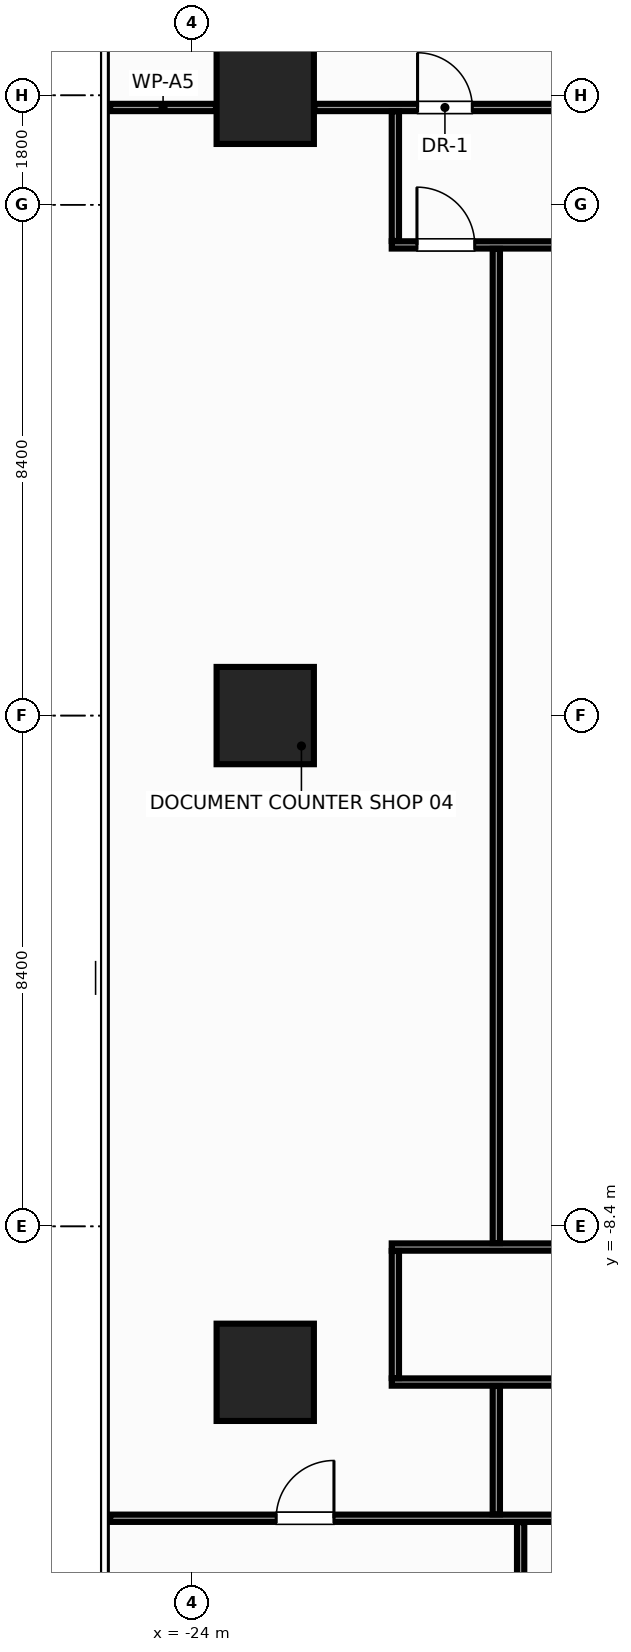
"""IFC4 building model, lengths in metres.
Left out: names, types, materials, properties, quantities, classifications, styles, units other than length and angle.
Written with IfcOpenShell. Run it as: python <this file> out.ifc"""

import sys

from ifc_helpers import new_model, si_unit, direction, frame, frame_2d, origin, origin_2d, place, context, subcontext, project, spatial, rectangle, extrude, source, transform, mapped, element, fill, save


model = new_model("IFC4")
c1 = context("Model", 3, precision=1e-05, world=origin(), true_north=direction((0.0, 1.0)))
c2 = subcontext(c1, "Body", "Model", "MODEL_VIEW")
j1 = project(units=[si_unit("LENGTHUNIT", "METRE"), si_unit("PLANEANGLEUNIT", "RADIAN")], contexts=[c1])
p1 = place(None, origin())
s1 = spatial("IfcSite", under=j1, at=p1, CompositionType="ELEMENT")
p2 = place(p1, origin())
s2 = spatial("IfcBuilding", under=s1, at=p2, CompositionType="ELEMENT")
p3 = place(p2, frame((0.0, 0.0, 84.8)))
s3 = spatial("IfcBuildingStorey", under=s2, at=p3, CompositionType="ELEMENT", Elevation=84.8)
m1 = source(origin(), c2, "Body", "SweptSolid", [
    extrude(rectangle(XDim=1.6, YDim=1.6, at=origin_2d()), origin(), (0.0, 0.0, 1.0), 3.6),
])
for number, where, z_axis, x_axis in (
    (1, (-22.8, -10.8, 0.0), (0.0, 0.0, 1.0), (1.0, 0.0, 0.0)),
    (2, (-22.8, 0.0, 0.0), (0.0, 0.0, 1.0), (1.0, 0.0, 0.0)),
    (3, (-22.8, 10.2, 0.0), (0.0, 0.0, 1.0), (1.0, 0.0, 0.0)),
):
    element("IfcColumn", number, at=place(p3, frame(where, z_axis=z_axis, x_axis=x_axis)), inside=s3, PredefinedType="COLUMN", context=c2, shape_type="MappedRepresentation", body=[
        mapped(m1, transform((0.0, 0.0, 0.0), x_axis=(1.0, 0.0, 0.0), y_axis=(0.0, 1.0, 0.0), z_axis=(0.0, 0.0, 1.0), scale=1.0)),
    ])
m2 = source(origin(), c2, "Body", "SweptSolid", [
    extrude(rectangle(XDim=1.74, YDim=0.12, at=frame_2d((0.87, 0.0))), origin(), (0.0, 0.0, 1.0), 3.36),
])
p4 = place(p3, frame((-25.35, 10.0, 0.0), z_axis=(0.0, 0.0, 1.0), x_axis=(1.0, 0.0, 0.0)))
e4 = element("IfcWall", 4, at=p4, inside=s3, PredefinedType="PARTITIONING", context=c2, shape_type="MappedRepresentation", body=[
    mapped(m2, transform((0.0, 0.0, 0.0), x_axis=(1.0, 0.0, 0.0), y_axis=(0.0, 1.0, 0.0), z_axis=(0.0, 0.0, 1.0), scale=1.0)),
])
m3 = source(origin(), c2, "Body", "SweptSolid", [
    extrude(rectangle(XDim=4.38, YDim=0.12, at=frame_2d((2.19, 0.0))), origin(), (0.0, 0.0, 1.0), 2.745),
])
p5 = place(p3, frame((-21.99, 10.0, 0.0), z_axis=(0.0, 0.0, 1.0), x_axis=(1.0, 0.0, 0.0)))
e5 = element("IfcWall", 5, at=p5, inside=s3, PredefinedType="PARTITIONING", context=c2, shape_type="MappedRepresentation", body=[
    mapped(m3, transform((0.0, 0.0, 0.0), x_axis=(1.0, 0.0, 0.0), y_axis=(0.0, 1.0, 0.0), z_axis=(0.0, 0.0, 1.0), scale=1.0)),
])
p6 = place(p5, frame((1.695, 0.0, 0.0)))
e6 = element("IfcOpeningElement", 6, at=p6, cuts=e5, PredefinedType="OPENING", context=c2, shape_type="SweptSolid", body=[
    extrude(rectangle(XDim=0.9, YDim=2.15, at=frame_2d((0.45, 1.075))), frame((0.0, 0.072, 0.0), z_axis=(0.0, -1.0, 0.0), x_axis=(1.0, 0.0, 0.0)), (0.0, 0.0, 1.0), 0.144),
])
m4 = source(origin(), c2, "Body", "SweptSolid", [
    extrude(rectangle(XDim=16.8, YDim=0.12, at=frame_2d((8.4, 0.0))), origin(), (0.0, 0.0, 1.0), 2.745),
])
p7 = place(p3, frame((-20.72, 7.74, 0.0), z_axis=(0.0, 0.0, 1.0), x_axis=(1.0, 0.0, 0.0)))
e7 = element("IfcWall", 7, at=p7, inside=s3, PredefinedType="PARTITIONING", context=c2, shape_type="MappedRepresentation", body=[
    mapped(m4, transform((0.0, 0.0, 0.0), x_axis=(1.0, 0.0, 0.0), y_axis=(0.0, 1.0, 0.0), z_axis=(0.0, 0.0, 1.0), scale=1.0)),
])
p8 = place(p7, frame((8.825, 0.0, 0.0)))
e8 = element("IfcOpeningElement", 8, at=p8, cuts=e7, PredefinedType="OPENING", context=c2, shape_type="SweptSolid", body=[
    extrude(rectangle(XDim=0.95, YDim=2.15, at=frame_2d((0.475, 1.075))), frame((0.0, 0.072, 0.0), z_axis=(0.0, -1.0, 0.0), x_axis=(1.0, 0.0, 0.0)), (0.0, 0.0, 1.0), 0.144),
])
p9 = place(p7, frame((0.415, 0.0, 0.0)))
e9 = element("IfcOpeningElement", 9, at=p9, cuts=e7, PredefinedType="OPENING", context=c2, shape_type="SweptSolid", body=[
    extrude(rectangle(XDim=0.95, YDim=2.15, at=frame_2d((0.475, 1.075))), frame((0.0, 0.072, 0.0), z_axis=(0.0, -1.0, 0.0), x_axis=(1.0, 0.0, 0.0)), (0.0, 0.0, 1.0), 0.144),
])
p10 = place(p3, frame((-20.72, -8.74, 0.0), z_axis=(0.0, 0.0, 1.0), x_axis=(1.0, 0.0, 0.0)))
e10 = element("IfcWall", 10, at=p10, inside=s3, PredefinedType="PARTITIONING", context=c2, shape_type="MappedRepresentation", body=[
    mapped(m4, transform((0.0, 0.0, 0.0), x_axis=(1.0, 0.0, 0.0), y_axis=(0.0, 1.0, 0.0), z_axis=(0.0, 0.0, 1.0), scale=1.0)),
])
m5 = source(origin(), c2, "Body", "SweptSolid", [
    extrude(rectangle(XDim=3.11, YDim=0.12, at=frame_2d((1.555, 0.0))), origin(), (0.0, 0.0, 1.0), 2.745),
])
p11 = place(p3, frame((-20.72, -10.96, 0.0), z_axis=(0.0, 0.0, 1.0), x_axis=(1.0, 0.0, 0.0)))
e11 = element("IfcWall", 11, at=p11, inside=s3, PredefinedType="PARTITIONING", context=c2, shape_type="MappedRepresentation", body=[
    mapped(m5, transform((0.0, 0.0, 0.0), x_axis=(1.0, 0.0, 0.0), y_axis=(0.0, 1.0, 0.0), z_axis=(0.0, 0.0, 1.0), scale=1.0)),
])
m6 = source(origin(), c2, "Body", "SweptSolid", [
    extrude(rectangle(XDim=2.13, YDim=0.12, at=frame_2d((1.065, 0.0))), origin(), (0.0, 0.0, 1.0), 3.36),
])
p12 = place(p3, frame((-20.66, 7.805, 0.0), z_axis=(0.0, 0.0, 1.0), x_axis=(0.0, 1.0, 0.0)))
e12 = element("IfcWall", 12, at=p12, inside=s3, PredefinedType="PARTITIONING", context=c2, shape_type="MappedRepresentation", body=[
    mapped(m6, transform((0.0, 0.0, 0.0), x_axis=(1.0, 0.0, 0.0), y_axis=(0.0, 1.0, 0.0), z_axis=(0.0, 0.0, 1.0), scale=1.0)),
])
m7 = source(origin(), c2, "Body", "SweptSolid", [
    extrude(rectangle(XDim=2.09, YDim=0.12, at=frame_2d((1.045, 0.0))), origin(), (0.0, 0.0, 1.0), 3.36),
])
p13 = place(p3, frame((-20.66, -10.895, 0.0), z_axis=(0.0, 0.0, 1.0), x_axis=(0.0, 1.0, 0.0)))
e13 = element("IfcWall", 13, at=p13, inside=s3, PredefinedType="PARTITIONING", context=c2, shape_type="MappedRepresentation", body=[
    mapped(m7, transform((0.0, 0.0, 0.0), x_axis=(1.0, 0.0, 0.0), y_axis=(0.0, 1.0, 0.0), z_axis=(0.0, 0.0, 1.0), scale=1.0)),
])
m8 = source(origin(), c2, "Body", "SweptSolid", [
    extrude(rectangle(XDim=50.7, YDim=0.12, at=frame_2d((25.35, 0.0))), origin(), (0.0, 0.0, 1.0), 2.945),
])
p14 = place(p3, frame((-25.35, -13.2, 0.0), z_axis=(0.0, 0.0, 1.0), x_axis=(1.0, 0.0, 0.0)))
e14 = element("IfcWall", 14, at=p14, inside=s3, PredefinedType="PARTITIONING", context=c2, shape_type="MappedRepresentation", body=[
    mapped(m8, transform((0.0, 0.0, 0.0), x_axis=(1.0, 0.0, 0.0), y_axis=(0.0, 1.0, 0.0), z_axis=(0.0, 0.0, 1.0), scale=1.0)),
])
p15 = place(p14, frame((46.92, 0.0, 0.0)))
e15 = element("IfcOpeningElement", 15, at=p15, cuts=e14, PredefinedType="OPENING", context=c2, shape_type="SweptSolid", body=[
    extrude(rectangle(XDim=0.95, YDim=2.15, at=frame_2d((0.475, 1.075))), frame((0.0, 0.072, 0.0), z_axis=(0.0, -1.0, 0.0), x_axis=(1.0, 0.0, 0.0)), (0.0, 0.0, 1.0), 0.144),
])
p16 = place(p14, frame((2.73, 0.0, 0.0)))
e16 = element("IfcOpeningElement", 16, at=p16, cuts=e14, PredefinedType="OPENING", context=c2, shape_type="SweptSolid", body=[
    extrude(rectangle(XDim=0.95, YDim=2.15, at=frame_2d((0.475, 1.075))), frame((0.0, 0.072, 0.0), z_axis=(0.0, -1.0, 0.0), x_axis=(1.0, 0.0, 0.0)), (0.0, 0.0, 1.0), 0.144),
])
p17 = place(p14, frame((9.375, 0.0, 0.0)))
e17 = element("IfcOpeningElement", 17, at=p17, cuts=e14, PredefinedType="OPENING", context=c2, shape_type="SweptSolid", body=[
    extrude(rectangle(XDim=0.95, YDim=2.15, at=frame_2d((0.475, 1.075))), frame((0.0, 0.072, 0.0), z_axis=(0.0, -1.0, 0.0), x_axis=(1.0, 0.0, 0.0)), (0.0, 0.0, 1.0), 0.144),
])
p18 = place(p14, frame((15.875, 0.0, 0.0)))
e18 = element("IfcOpeningElement", 18, at=p18, cuts=e14, PredefinedType="OPENING", context=c2, shape_type="SweptSolid", body=[
    extrude(rectangle(XDim=0.95, YDim=2.15, at=frame_2d((0.475, 1.075))), frame((0.0, 0.072, 0.0), z_axis=(0.0, -1.0, 0.0), x_axis=(1.0, 0.0, 0.0)), (0.0, 0.0, 1.0), 0.144),
])
p19 = place(p14, frame((24.875, 0.0, 0.0)))
e19 = element("IfcOpeningElement", 19, at=p19, cuts=e14, PredefinedType="OPENING", context=c2, shape_type="SweptSolid", body=[
    extrude(rectangle(XDim=0.95, YDim=2.15, at=frame_2d((0.475, 1.075))), frame((0.0, 0.072, 0.0), z_axis=(0.0, -1.0, 0.0), x_axis=(1.0, 0.0, 0.0)), (0.0, 0.0, 1.0), 0.144),
])
p20 = place(p14, frame((35.375, 0.0, 0.0)))
e20 = element("IfcOpeningElement", 20, at=p20, cuts=e14, PredefinedType="OPENING", context=c2, shape_type="SweptSolid", body=[
    extrude(rectangle(XDim=0.95, YDim=2.15, at=frame_2d((0.475, 1.075))), frame((0.0, 0.072, 0.0), z_axis=(0.0, -1.0, 0.0), x_axis=(1.0, 0.0, 0.0)), (0.0, 0.0, 1.0), 0.144),
])
p21 = place(p14, frame((40.675, 0.0, 0.0)))
e21 = element("IfcOpeningElement", 21, at=p21, cuts=e14, PredefinedType="OPENING", context=c2, shape_type="SweptSolid", body=[
    extrude(rectangle(XDim=0.95, YDim=2.15, at=frame_2d((0.475, 1.075))), frame((0.0, 0.072, 0.0), z_axis=(0.0, -1.0, 0.0), x_axis=(1.0, 0.0, 0.0)), (0.0, 0.0, 1.0), 0.144),
])
m9 = source(origin(), c2, "Body", "SweptSolid", [
    extrude(rectangle(XDim=2.11, YDim=0.12, at=frame_2d((1.055, 0.0))), origin(), (0.0, 0.0, 1.0), 3.36),
])
p22 = place(p3, frame((-19.0, -13.135, 0.0), z_axis=(0.0, 0.0, 1.0), x_axis=(0.0, 1.0, 0.0)))
e22 = element("IfcWall", 22, at=p22, inside=s3, PredefinedType="PARTITIONING", context=c2, shape_type="MappedRepresentation", body=[
    mapped(m9, transform((0.0, 0.0, 0.0), x_axis=(1.0, 0.0, 0.0), y_axis=(0.0, 1.0, 0.0), z_axis=(0.0, 0.0, 1.0), scale=1.0)),
])
m10 = source(origin(), c2, "Body", "SweptSolid", [
    extrude(rectangle(XDim=16.35, YDim=0.12, at=frame_2d((8.175, 0.0))), origin(), (0.0, 0.0, 1.0), 2.745),
])
p23 = place(p3, frame((-19.0, -8.675, 0.0), z_axis=(0.0, 0.0, 1.0), x_axis=(0.0, 1.0, 0.0)))
e23 = element("IfcWall", 23, at=p23, inside=s3, PredefinedType="PARTITIONING", context=c2, shape_type="MappedRepresentation", body=[
    mapped(m10, transform((0.0, 0.0, 0.0), x_axis=(1.0, 0.0, 0.0), y_axis=(0.0, 1.0, 0.0), z_axis=(0.0, 0.0, 1.0), scale=1.0)),
])
m11 = source(origin(), c2, "Body", "SweptSolid", [
    extrude(rectangle(XDim=12.385, YDim=0.12, at=frame_2d((6.192, 0.0))), origin(), (0.0, 0.0, 1.0), 2.745),
])
p24 = place(p3, frame((-18.6, -25.65, 0.0), z_axis=(0.0, 0.0, 1.0), x_axis=(0.0, 1.0, 0.0)))
e24 = element("IfcWall", 24, at=p24, inside=s3, PredefinedType="PARTITIONING", context=c2, shape_type="MappedRepresentation", body=[
    mapped(m11, transform((0.0, 0.0, 0.0), x_axis=(1.0, 0.0, 0.0), y_axis=(0.0, 1.0, 0.0), z_axis=(0.0, 0.0, 1.0), scale=1.0)),
])
m12 = source(origin(), c2, "Body", "SweptSolid", [
    extrude(rectangle(XDim=0.9, YDim=2.15, at=frame_2d((0.45, 1.075))), frame((0.0, 0.025, 0.0), z_axis=(0.0, -1.0, 0.0), x_axis=(1.0, 0.0, 0.0)), (0.0, 0.0, 1.0), 0.05),
])
p25 = place(p6, origin())
e25 = element("IfcDoor", 25, at=p25, inside=s3, OperationType="SINGLE_SWING_LEFT", PredefinedType="DOOR", context=c2, shape_type="MappedRepresentation", body=[
    mapped(m12, transform((0.0, 0.0, 0.0), x_axis=(1.0, 0.0, 0.0), y_axis=(0.0, 1.0, 0.0), z_axis=(0.0, 0.0, 1.0), scale=1.0)),
])
fill(e6, e25)
m13 = source(origin(), c2, "Body", "SweptSolid", [
    extrude(rectangle(XDim=0.95, YDim=2.15, at=frame_2d((0.475, 1.075))), frame((0.0, 0.025, 0.0), z_axis=(0.0, -1.0, 0.0), x_axis=(1.0, 0.0, 0.0)), (0.0, 0.0, 1.0), 0.05),
])
p26 = place(p9, origin())
e26 = element("IfcDoor", 26, at=p26, inside=s3, OperationType="SINGLE_SWING_LEFT", PredefinedType="DOOR", context=c2, shape_type="MappedRepresentation", body=[
    mapped(m13, transform((0.0, 0.0, 0.0), x_axis=(1.0, 0.0, 0.0), y_axis=(0.0, 1.0, 0.0), z_axis=(0.0, 0.0, 1.0), scale=1.0)),
])
fill(e9, e26)
p27 = place(p16, origin())
e27 = element("IfcDoor", 27, at=p27, inside=s3, OperationType="SINGLE_SWING_RIGHT", PredefinedType="DOOR", context=c2, shape_type="MappedRepresentation", body=[
    mapped(m13, transform((0.0, 0.0, 0.0), x_axis=(1.0, 0.0, 0.0), y_axis=(0.0, 1.0, 0.0), z_axis=(0.0, 0.0, 1.0), scale=1.0)),
])
fill(e16, e27)
save(model, sys.argv[1])
